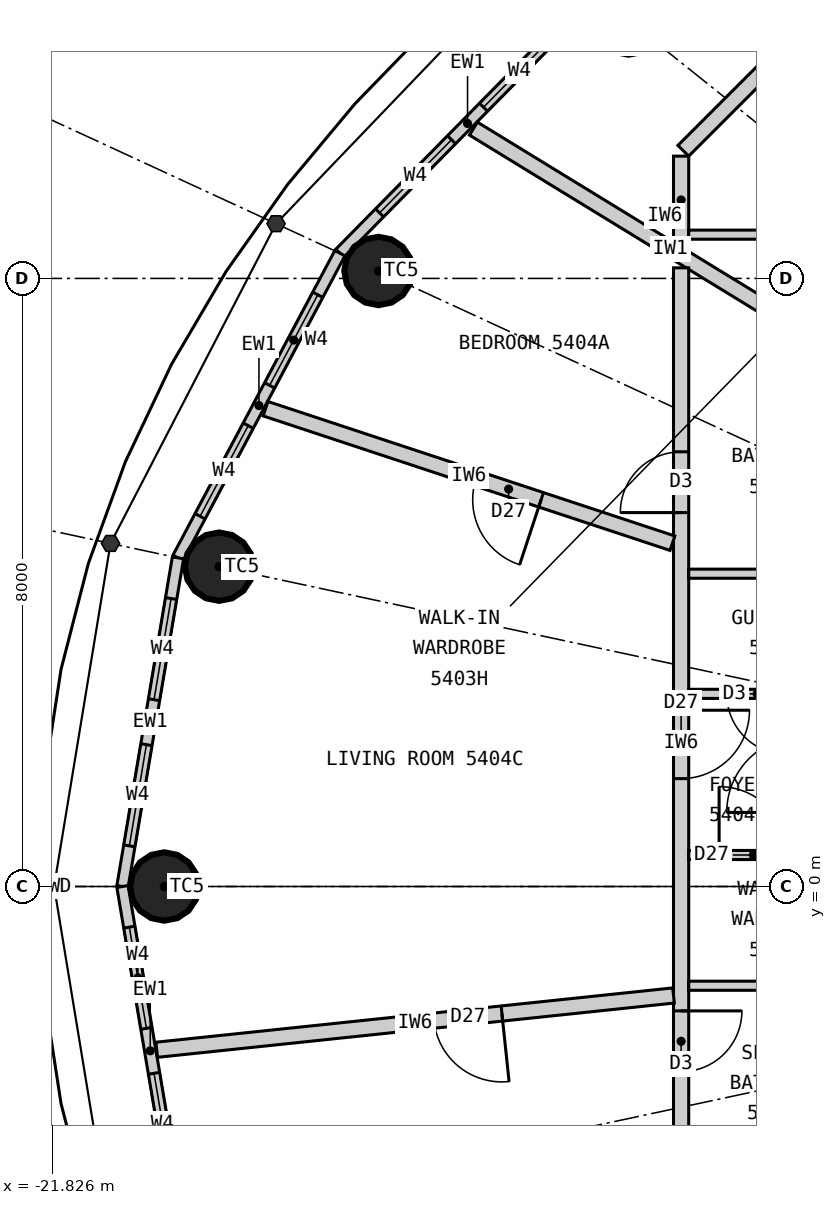
"""IFC4 building model, lengths in metres.
Left out: names, types, materials, properties, quantities, classifications, styles, units other than length and angle.
Written with IfcOpenShell. Run it as: python <this file> out.ifc"""

import sys

from ifc_helpers import new_model, si_unit, direction, frame, frame_2d, origin, origin_2d, place, context, subcontext, project, spatial, rectangle, circle, extrude, element, fill, save


model = new_model("IFC4")
c1 = context("Model", 3, precision=1e-05, world=origin(), true_north=direction((0.0, 1.0)))
c2 = subcontext(c1, "Body", "Model", "MODEL_VIEW")
j1 = project(units=[si_unit("LENGTHUNIT", "METRE"), si_unit("PLANEANGLEUNIT", "RADIAN")], contexts=[c1])
p1 = place(None, origin())
s1 = spatial("IfcSite", under=j1, at=p1, CompositionType="ELEMENT")
p2 = place(p1, origin())
s2 = spatial("IfcBuilding", under=s1, at=p2, CompositionType="ELEMENT")
p3 = place(p2, frame((0.0, 0.0, 202.8)))
s3 = spatial("IfcBuildingStorey", under=s2, at=p3, CompositionType="ELEMENT", Elevation=202.8)
for number, where, z_axis, x_axis in (
    (1, (-14.241, 11.393, 0.0), (0.0, 0.0, 1.0), (1.0, 0.0, 0.0)),
    (2, (-17.532, 8.098, 0.0), (0.0, 0.0, 1.0), (1.0, 0.0, 0.0)),
    (3, (-19.629, 4.208, 0.0), (0.0, 0.0, 1.0), (1.0, 0.0, 0.0)),
    (4, (-20.35, 0.0, 0.0), (0.0, 0.0, 1.0), (1.0, 0.0, 0.0)),
):
    element("IfcColumn", number, at=place(p3, frame(where, z_axis=z_axis, x_axis=x_axis)), inside=s3, PredefinedType="COLUMN", context=c2, shape_type="SweptSolid", body=[
        extrude(circle(Radius=0.45, at=origin_2d()), origin(), (0.0, 0.0, 1.0), 3.3),
    ])
p4 = place(p3, frame((-14.68, 11.744, 0.0), z_axis=(0.0, 0.0, 1.0), x_axis=(-0.701527379618, -0.712642501993, 0.0)))
e5 = element("IfcWall", 5, at=p4, inside=s3, PredefinedType="ELEMENTEDWALL", context=c2, shape_type="SweptSolid", body=[
    extrude(rectangle(XDim=4.788, YDim=0.15, at=frame_2d((2.394, 0.0))), origin(), (0.0, 0.0, 1.0), 3.12),
])
p5 = place(p4, frame((0.744, 0.0, 0.9)))
e6 = element("IfcOpeningElement", 6, at=p5, cuts=e5, PredefinedType="OPENING", context=c2, shape_type="SweptSolid", body=[
    extrude(rectangle(XDim=1.35, YDim=1.9, at=frame_2d((0.675, 0.95))), frame((0.0, 0.085, 0.0), z_axis=(0.0, -1.0, 0.0), x_axis=(1.0, 0.0, 0.0)), (0.0, 0.0, 1.0), 0.17),
])
p6 = place(p4, frame((2.694, 0.0, 0.9)))
e7 = element("IfcOpeningElement", 7, at=p6, cuts=e5, PredefinedType="OPENING", context=c2, shape_type="SweptSolid", body=[
    extrude(rectangle(XDim=1.35, YDim=1.9, at=frame_2d((0.675, 0.95))), frame((0.0, 0.085, 0.0), z_axis=(0.0, -1.0, 0.0), x_axis=(1.0, 0.0, 0.0)), (0.0, 0.0, 1.0), 0.17),
])
p7 = place(p3, frame((-18.04, 8.332, 0.0), z_axis=(0.0, 0.0, 1.0), x_axis=(-0.469256152955, -0.883062094597, 0.0)))
e8 = element("IfcWall", 8, at=p7, inside=s3, PredefinedType="ELEMENTEDWALL", context=c2, shape_type="SweptSolid", body=[
    extrude(rectangle(XDim=4.539, YDim=0.15, at=frame_2d((2.27, 0.0))), origin(), (0.0, 0.0, 1.0), 3.12),
])
p8 = place(p7, frame((0.62, 0.0, 0.9)))
e9 = element("IfcOpeningElement", 9, at=p8, cuts=e8, PredefinedType="OPENING", context=c2, shape_type="SweptSolid", body=[
    extrude(rectangle(XDim=1.35, YDim=1.9, at=frame_2d((0.675, 0.95))), frame((0.0, 0.085, 0.0), z_axis=(0.0, -1.0, 0.0), x_axis=(1.0, 0.0, 0.0)), (0.0, 0.0, 1.0), 0.17),
])
p9 = place(p7, frame((2.57, 0.0, 0.9)))
e10 = element("IfcOpeningElement", 10, at=p9, cuts=e8, PredefinedType="OPENING", context=c2, shape_type="SweptSolid", body=[
    extrude(rectangle(XDim=1.35, YDim=1.9, at=frame_2d((0.675, 0.95))), frame((0.0, 0.085, 0.0), z_axis=(0.0, -1.0, 0.0), x_axis=(1.0, 0.0, 0.0)), (0.0, 0.0, 1.0), 0.17),
])
p10 = place(p3, frame((-20.17, 4.323, 0.0), z_axis=(0.0, 0.0, 1.0), x_axis=(-0.166538513568, -0.986034950445, 0.0)))
e11 = element("IfcWall", 11, at=p10, inside=s3, PredefinedType="ELEMENTEDWALL", context=c2, shape_type="SweptSolid", body=[
    extrude(rectangle(XDim=4.385, YDim=0.15, at=frame_2d((2.192, 0.0))), origin(), (0.0, 0.0, 1.0), 3.12),
])
p11 = place(p10, frame((0.542, 0.0, 0.9)))
e12 = element("IfcOpeningElement", 12, at=p11, cuts=e11, PredefinedType="OPENING", context=c2, shape_type="SweptSolid", body=[
    extrude(rectangle(XDim=1.35, YDim=1.9, at=frame_2d((0.675, 0.95))), frame((0.0, 0.085, 0.0), z_axis=(0.0, -1.0, 0.0), x_axis=(1.0, 0.0, 0.0)), (0.0, 0.0, 1.0), 0.17),
])
p12 = place(p10, frame((2.492, 0.0, 0.9)))
e13 = element("IfcOpeningElement", 13, at=p12, cuts=e11, PredefinedType="OPENING", context=c2, shape_type="SweptSolid", body=[
    extrude(rectangle(XDim=1.35, YDim=1.9, at=frame_2d((0.675, 0.95))), frame((0.0, 0.085, 0.0), z_axis=(0.0, -1.0, 0.0), x_axis=(1.0, 0.0, 0.0)), (0.0, 0.0, 1.0), 0.17),
])
p13 = place(p3, frame((-20.9, 0.0, 0.0), z_axis=(0.0, 0.0, 1.0), x_axis=(0.166538513568, -0.986034950445, 0.0)))
e14 = element("IfcWall", 14, at=p13, inside=s3, PredefinedType="ELEMENTEDWALL", context=c2, shape_type="SweptSolid", body=[
    extrude(rectangle(XDim=4.385, YDim=0.15, at=frame_2d((2.192, 0.0))), origin(), (0.0, 0.0, 1.0), 3.12),
])
p14 = place(p13, frame((0.542, 0.0, 0.9)))
e15 = element("IfcOpeningElement", 15, at=p14, cuts=e14, PredefinedType="OPENING", context=c2, shape_type="SweptSolid", body=[
    extrude(rectangle(XDim=1.35, YDim=1.9, at=frame_2d((0.675, 0.95))), frame((0.0, 0.085, 0.0), z_axis=(0.0, -1.0, 0.0), x_axis=(1.0, 0.0, 0.0)), (0.0, 0.0, 1.0), 0.17),
])
p15 = place(p13, frame((2.492, 0.0, 0.9)))
e16 = element("IfcOpeningElement", 16, at=p15, cuts=e14, PredefinedType="OPENING", context=c2, shape_type="SweptSolid", body=[
    extrude(rectangle(XDim=1.35, YDim=1.9, at=frame_2d((0.675, 0.95))), frame((0.0, 0.085, 0.0), z_axis=(0.0, -1.0, 0.0), x_axis=(1.0, 0.0, 0.0)), (0.0, 0.0, 1.0), 0.17),
])
p16 = place(p3, frame((-11.1, 6.797, 0.0), z_axis=(0.0, 0.0, 1.0), x_axis=(-0.852799818179, 0.522237943963, 0.0)))
e17 = element("IfcWall", 17, at=p16, inside=s3, PredefinedType="PARTITIONING", context=c2, shape_type="SweptSolid", body=[
    extrude(rectangle(XDim=6.077, YDim=0.2, at=frame_2d((3.039, 0.0))), origin(), (0.0, 0.0, 1.0), 3.12),
])
p17 = place(p3, frame((-10.679, 12.521, 0.0), z_axis=(0.0, 0.0, 1.0), x_axis=(-0.707106781187, -0.707106781187, 0.0)))
e18 = element("IfcWall", 18, at=p17, inside=s3, PredefinedType="PARTITIONING", context=c2, shape_type="SweptSolid", body=[
    extrude(rectangle(XDim=4.019, YDim=0.2, at=frame_2d((2.009, 0.0))), origin(), (0.0, 0.0, 1.0), 3.12),
])
p18 = place(p3, frame((-13.55, 9.609, 0.0), z_axis=(0.0, 0.0, 1.0), x_axis=(0.0, -1.0, 0.0)))
e19 = element("IfcWall", 19, at=p18, inside=s3, PredefinedType="PARTITIONING", context=c2, shape_type="SweptSolid", body=[
    extrude(rectangle(XDim=1.153, YDim=0.2, at=frame_2d((0.576, 0.0))), origin(), (0.0, 0.0, 1.0), 3.12),
])
p19 = place(p3, frame((-11.1, 8.576, 0.0), z_axis=(0.0, 0.0, 1.0), x_axis=(-1.0, 0.0, 0.0)))
e20 = element("IfcWall", 20, at=p19, inside=s3, PredefinedType="PARTITIONING", context=c2, shape_type="SweptSolid", body=[
    extrude(rectangle(XDim=2.35, YDim=0.12, at=frame_2d((1.175, 0.0))), origin(), (0.0, 0.0, 1.0), 3.12),
])
p20 = place(p19, frame((0.22, 0.0, 0.0)))
e21 = element("IfcOpeningElement", 21, at=p20, cuts=e20, PredefinedType="OPENING", context=c2, shape_type="SweptSolid", body=[
    extrude(rectangle(XDim=0.9, YDim=2.1, at=frame_2d((0.45, 1.05))), frame((0.0, 0.07, 0.0), z_axis=(0.0, -1.0, 0.0), x_axis=(1.0, 0.0, 0.0)), (0.0, 0.0, 1.0), 0.14),
])
p21 = place(p3, frame((-13.55, 8.139, 0.0), z_axis=(0.0, 0.0, 1.0), x_axis=(0.0, -1.0, 0.0)))
e22 = element("IfcWall", 22, at=p21, inside=s3, PredefinedType="PARTITIONING", context=c2, shape_type="SweptSolid", body=[
    extrude(rectangle(XDim=12.496, YDim=0.2, at=frame_2d((6.248, 0.0))), origin(), (0.0, 0.0, 1.0), 3.12),
])
p22 = place(p21, frame((2.42, 0.0, 0.0)))
e23 = element("IfcOpeningElement", 23, at=p22, cuts=e22, PredefinedType="OPENING", context=c2, shape_type="SweptSolid", body=[
    extrude(rectangle(XDim=0.8, YDim=2.1, at=frame_2d((0.4, 1.05))), frame((0.0, 0.11, 0.0), z_axis=(0.0, -1.0, 0.0), x_axis=(1.0, 0.0, 0.0)), (0.0, 0.0, 1.0), 0.22),
])
p23 = place(p21, frame((9.776, 0.0, 0.0)))
e24 = element("IfcOpeningElement", 24, at=p23, cuts=e22, PredefinedType="OPENING", context=c2, shape_type="SweptSolid", body=[
    extrude(rectangle(XDim=0.8, YDim=2.1, at=frame_2d((0.4, 1.05))), frame((0.0, 0.11, 0.0), z_axis=(0.0, -1.0, 0.0), x_axis=(1.0, 0.0, 0.0)), (0.0, 0.0, 1.0), 0.22),
])
p24 = place(p21, frame((5.82, 0.0, 0.0)))
e25 = element("IfcOpeningElement", 25, at=p24, cuts=e22, PredefinedType="OPENING", context=c2, shape_type="SweptSolid", body=[
    extrude(rectangle(XDim=0.9, YDim=2.1, at=frame_2d((0.45, 1.05))), frame((0.0, 0.11, 0.0), z_axis=(0.0, -1.0, 0.0), x_axis=(1.0, 0.0, 0.0)), (0.0, 0.0, 1.0), 0.22),
])
p25 = place(p3, frame((-13.664, 4.516, 0.0), z_axis=(0.0, 0.0, 1.0), x_axis=(-0.949481375941, 0.313823384632, 0.0)))
e26 = element("IfcWall", 26, at=p25, inside=s3, PredefinedType="PARTITIONING", context=c2, shape_type="SweptSolid", body=[
    extrude(rectangle(XDim=5.638, YDim=0.2, at=frame_2d((2.819, 0.0))), origin(), (0.0, 0.0, 1.0), 3.12),
])
p26 = place(p25, frame((1.82, 0.0, 0.0)))
e27 = element("IfcOpeningElement", 27, at=p26, cuts=e26, PredefinedType="OPENING", context=c2, shape_type="SweptSolid", body=[
    extrude(rectangle(XDim=0.9, YDim=2.1, at=frame_2d((0.45, 1.05))), frame((0.0, 0.11, 0.0), z_axis=(0.0, -1.0, 0.0), x_axis=(1.0, 0.0, 0.0)), (0.0, 0.0, 1.0), 0.22),
])
p27 = place(p3, frame((-13.65, -1.434, 0.0), z_axis=(0.0, 0.0, 1.0), x_axis=(-0.994526954268, -0.10448031984, 0.0)))
e28 = element("IfcWall", 28, at=p27, inside=s3, PredefinedType="PARTITIONING", context=c2, shape_type="SweptSolid", body=[
    extrude(rectangle(XDim=6.837, YDim=0.2, at=frame_2d((3.418, 0.0))), origin(), (0.0, 0.0, 1.0), 2.47),
])
p28 = place(p27, frame((2.27, 0.0, 0.0)))
e29 = element("IfcOpeningElement", 29, at=p28, cuts=e28, PredefinedType="OPENING", context=c2, shape_type="SweptSolid", body=[
    extrude(rectangle(XDim=0.9, YDim=2.1, at=frame_2d((0.45, 1.05))), frame((0.0, 0.11, 0.0), z_axis=(0.0, -1.0, 0.0), x_axis=(1.0, 0.0, 0.0)), (0.0, 0.0, 1.0), 0.22),
])
p29 = place(p3, frame((-11.1, 4.115, 0.0), z_axis=(0.0, 0.0, 1.0), x_axis=(-1.0, 0.0, 0.0)))
e30 = element("IfcWall", 30, at=p29, inside=s3, PredefinedType="PARTITIONING", context=c2, shape_type="SweptSolid", body=[
    extrude(rectangle(XDim=2.35, YDim=0.12, at=frame_2d((1.175, 0.0))), origin(), (0.0, 0.0, 1.0), 3.12),
])
p30 = place(p3, frame((-11.1, 2.534, 0.0), z_axis=(0.0, 0.0, 1.0), x_axis=(-1.0, 0.0, 0.0)))
e31 = element("IfcWall", 31, at=p30, inside=s3, PredefinedType="PARTITIONING", context=c2, shape_type="SweptSolid", body=[
    extrude(rectangle(XDim=2.35, YDim=0.12, at=frame_2d((1.175, 0.0))), origin(), (0.0, 0.0, 1.0), 3.12),
])
p31 = place(p30, frame((1.05, 0.0, 0.0)))
e32 = element("IfcOpeningElement", 32, at=p31, cuts=e31, PredefinedType="OPENING", context=c2, shape_type="SweptSolid", body=[
    extrude(rectangle(XDim=0.8, YDim=2.1, at=frame_2d((0.4, 1.05))), frame((0.0, 0.07, 0.0), z_axis=(0.0, -1.0, 0.0), x_axis=(1.0, 0.0, 0.0)), (0.0, 0.0, 1.0), 0.14),
])
p32 = place(p3, frame((-11.1, 0.414, 0.0), z_axis=(0.0, 0.0, 1.0), x_axis=(-1.0, 0.0, 0.0)))
e33 = element("IfcWall", 33, at=p32, inside=s3, PredefinedType="PARTITIONING", context=c2, shape_type="SweptSolid", body=[
    extrude(rectangle(XDim=2.35, YDim=0.12, at=frame_2d((1.175, 0.0))), origin(), (0.0, 0.0, 1.0), 3.12),
])
p33 = place(p32, frame((1.05, 0.0, 0.0)))
e34 = element("IfcOpeningElement", 34, at=p33, cuts=e33, PredefinedType="OPENING", context=c2, shape_type="SweptSolid", body=[
    extrude(rectangle(XDim=0.9, YDim=2.1, at=frame_2d((0.45, 1.05))), frame((0.0, 0.07, 0.0), z_axis=(0.0, -1.0, 0.0), x_axis=(1.0, 0.0, 0.0)), (0.0, 0.0, 1.0), 0.14),
])
p34 = place(p3, frame((-11.1, -1.306, 0.0), z_axis=(0.0, 0.0, 1.0), x_axis=(-1.0, 0.0, 0.0)))
e35 = element("IfcWall", 35, at=p34, inside=s3, PredefinedType="PARTITIONING", context=c2, shape_type="SweptSolid", body=[
    extrude(rectangle(XDim=2.35, YDim=0.12, at=frame_2d((1.175, 0.0))), origin(), (0.0, 0.0, 1.0), 3.12),
])
p35 = place(p5, origin())
e36 = element("IfcWindow", 36, at=p35, inside=s3, PartitioningType="SINGLE_PANEL", PredefinedType="WINDOW", context=c2, shape_type="SweptSolid", body=[
    extrude(rectangle(XDim=1.35, YDim=1.9, at=frame_2d((0.675, 0.95))), frame((0.0, 0.03, 0.0), z_axis=(0.0, -1.0, 0.0), x_axis=(1.0, 0.0, 0.0)), (0.0, 0.0, 1.0), 0.06),
])
fill(e6, e36)
p36 = place(p6, origin())
e37 = element("IfcWindow", 37, at=p36, inside=s3, PartitioningType="SINGLE_PANEL", PredefinedType="WINDOW", context=c2, shape_type="SweptSolid", body=[
    extrude(rectangle(XDim=1.35, YDim=1.9, at=frame_2d((0.675, 0.95))), frame((0.0, 0.03, 0.0), z_axis=(0.0, -1.0, 0.0), x_axis=(1.0, 0.0, 0.0)), (0.0, 0.0, 1.0), 0.06),
])
fill(e7, e37)
p37 = place(p8, origin())
e38 = element("IfcWindow", 38, at=p37, inside=s3, PartitioningType="SINGLE_PANEL", PredefinedType="WINDOW", context=c2, shape_type="SweptSolid", body=[
    extrude(rectangle(XDim=1.35, YDim=1.9, at=frame_2d((0.675, 0.95))), frame((0.0, 0.03, 0.0), z_axis=(0.0, -1.0, 0.0), x_axis=(1.0, 0.0, 0.0)), (0.0, 0.0, 1.0), 0.06),
])
fill(e9, e38)
p38 = place(p9, origin())
e39 = element("IfcWindow", 39, at=p38, inside=s3, PartitioningType="SINGLE_PANEL", PredefinedType="WINDOW", context=c2, shape_type="SweptSolid", body=[
    extrude(rectangle(XDim=1.35, YDim=1.9, at=frame_2d((0.675, 0.95))), frame((0.0, 0.03, 0.0), z_axis=(0.0, -1.0, 0.0), x_axis=(1.0, 0.0, 0.0)), (0.0, 0.0, 1.0), 0.06),
])
fill(e10, e39)
p39 = place(p11, origin())
e40 = element("IfcWindow", 40, at=p39, inside=s3, PartitioningType="SINGLE_PANEL", PredefinedType="WINDOW", context=c2, shape_type="SweptSolid", body=[
    extrude(rectangle(XDim=1.35, YDim=1.9, at=frame_2d((0.675, 0.95))), frame((0.0, 0.03, 0.0), z_axis=(0.0, -1.0, 0.0), x_axis=(1.0, 0.0, 0.0)), (0.0, 0.0, 1.0), 0.06),
])
fill(e12, e40)
p40 = place(p12, origin())
e41 = element("IfcWindow", 41, at=p40, inside=s3, PartitioningType="SINGLE_PANEL", PredefinedType="WINDOW", context=c2, shape_type="SweptSolid", body=[
    extrude(rectangle(XDim=1.35, YDim=1.9, at=frame_2d((0.675, 0.95))), frame((0.0, 0.03, 0.0), z_axis=(0.0, -1.0, 0.0), x_axis=(1.0, 0.0, 0.0)), (0.0, 0.0, 1.0), 0.06),
])
fill(e13, e41)
p41 = place(p14, origin())
e42 = element("IfcWindow", 42, at=p41, inside=s3, PartitioningType="SINGLE_PANEL", PredefinedType="WINDOW", context=c2, shape_type="SweptSolid", body=[
    extrude(rectangle(XDim=1.35, YDim=1.9, at=frame_2d((0.675, 0.95))), frame((0.0, 0.03, 0.0), z_axis=(0.0, -1.0, 0.0), x_axis=(1.0, 0.0, 0.0)), (0.0, 0.0, 1.0), 0.06),
])
fill(e15, e42)
p42 = place(p15, origin())
e43 = element("IfcWindow", 43, at=p42, inside=s3, PartitioningType="SINGLE_PANEL", PredefinedType="WINDOW", context=c2, shape_type="SweptSolid", body=[
    extrude(rectangle(XDim=1.35, YDim=1.9, at=frame_2d((0.675, 0.95))), frame((0.0, 0.03, 0.0), z_axis=(0.0, -1.0, 0.0), x_axis=(1.0, 0.0, 0.0)), (0.0, 0.0, 1.0), 0.06),
])
fill(e16, e43)
p43 = place(p22, origin())
e44 = element("IfcDoor", 44, at=p43, inside=s3, OperationType="SINGLE_SWING_RIGHT", PredefinedType="DOOR", context=c2, shape_type="SweptSolid", body=[
    extrude(rectangle(XDim=0.8, YDim=2.1, at=frame_2d((0.4, 1.05))), frame((0.0, 0.025, 0.0), z_axis=(0.0, -1.0, 0.0), x_axis=(1.0, 0.0, 0.0)), (0.0, 0.0, 1.0), 0.05),
])
fill(e23, e44)
p44 = place(p31, origin())
e45 = element("IfcDoor", 45, at=p44, inside=s3, OperationType="SINGLE_SWING_LEFT", PredefinedType="DOOR", context=c2, shape_type="SweptSolid", body=[
    extrude(rectangle(XDim=0.8, YDim=2.1, at=frame_2d((0.4, 1.05))), frame((0.0, 0.025, 0.0), z_axis=(0.0, -1.0, 0.0), x_axis=(1.0, 0.0, 0.0)), (0.0, 0.0, 1.0), 0.05),
])
fill(e32, e45)
p45 = place(p33, origin())
e46 = element("IfcDoor", 46, at=p45, inside=s3, OperationType="SINGLE_SWING_RIGHT", PredefinedType="DOOR", context=c2, shape_type="SweptSolid", body=[
    extrude(rectangle(XDim=0.9, YDim=2.1, at=frame_2d((0.45, 1.05))), frame((0.0, 0.025, 0.0), z_axis=(0.0, -1.0, 0.0), x_axis=(1.0, 0.0, 0.0)), (0.0, 0.0, 1.0), 0.05),
])
fill(e34, e46)
p46 = place(p23, origin())
e47 = element("IfcDoor", 47, at=p46, inside=s3, OperationType="SINGLE_SWING_LEFT", PredefinedType="DOOR", context=c2, shape_type="SweptSolid", body=[
    extrude(rectangle(XDim=0.8, YDim=2.1, at=frame_2d((0.4, 1.05))), frame((0.0, 0.025, 0.0), z_axis=(0.0, -1.0, 0.0), x_axis=(1.0, 0.0, 0.0)), (0.0, 0.0, 1.0), 0.05),
])
fill(e24, e47)
p47 = place(p24, origin())
e48 = element("IfcDoor", 48, at=p47, inside=s3, OperationType="SINGLE_SWING_LEFT", PredefinedType="DOOR", context=c2, shape_type="SweptSolid", body=[
    extrude(rectangle(XDim=0.9, YDim=2.1, at=frame_2d((0.45, 1.05))), frame((0.0, 0.025, 0.0), z_axis=(0.0, -1.0, 0.0), x_axis=(1.0, 0.0, 0.0)), (0.0, 0.0, 1.0), 0.05),
])
fill(e25, e48)
p48 = place(p26, origin())
e49 = element("IfcDoor", 49, at=p48, inside=s3, OperationType="SINGLE_SWING_LEFT", PredefinedType="DOOR", context=c2, shape_type="SweptSolid", body=[
    extrude(rectangle(XDim=0.9, YDim=2.1, at=frame_2d((0.45, 1.05))), frame((0.0, 0.025, 0.0), z_axis=(0.0, -1.0, 0.0), x_axis=(1.0, 0.0, 0.0)), (0.0, 0.0, 1.0), 0.05),
])
fill(e27, e49)
p49 = place(p28, origin())
e50 = element("IfcDoor", 50, at=p49, inside=s3, OperationType="SINGLE_SWING_LEFT", PredefinedType="DOOR", context=c2, shape_type="SweptSolid", body=[
    extrude(rectangle(XDim=0.9, YDim=2.1, at=frame_2d((0.45, 1.05))), frame((0.0, 0.025, 0.0), z_axis=(0.0, -1.0, 0.0), x_axis=(1.0, 0.0, 0.0)), (0.0, 0.0, 1.0), 0.05),
])
fill(e29, e50)
save(model, sys.argv[1])
